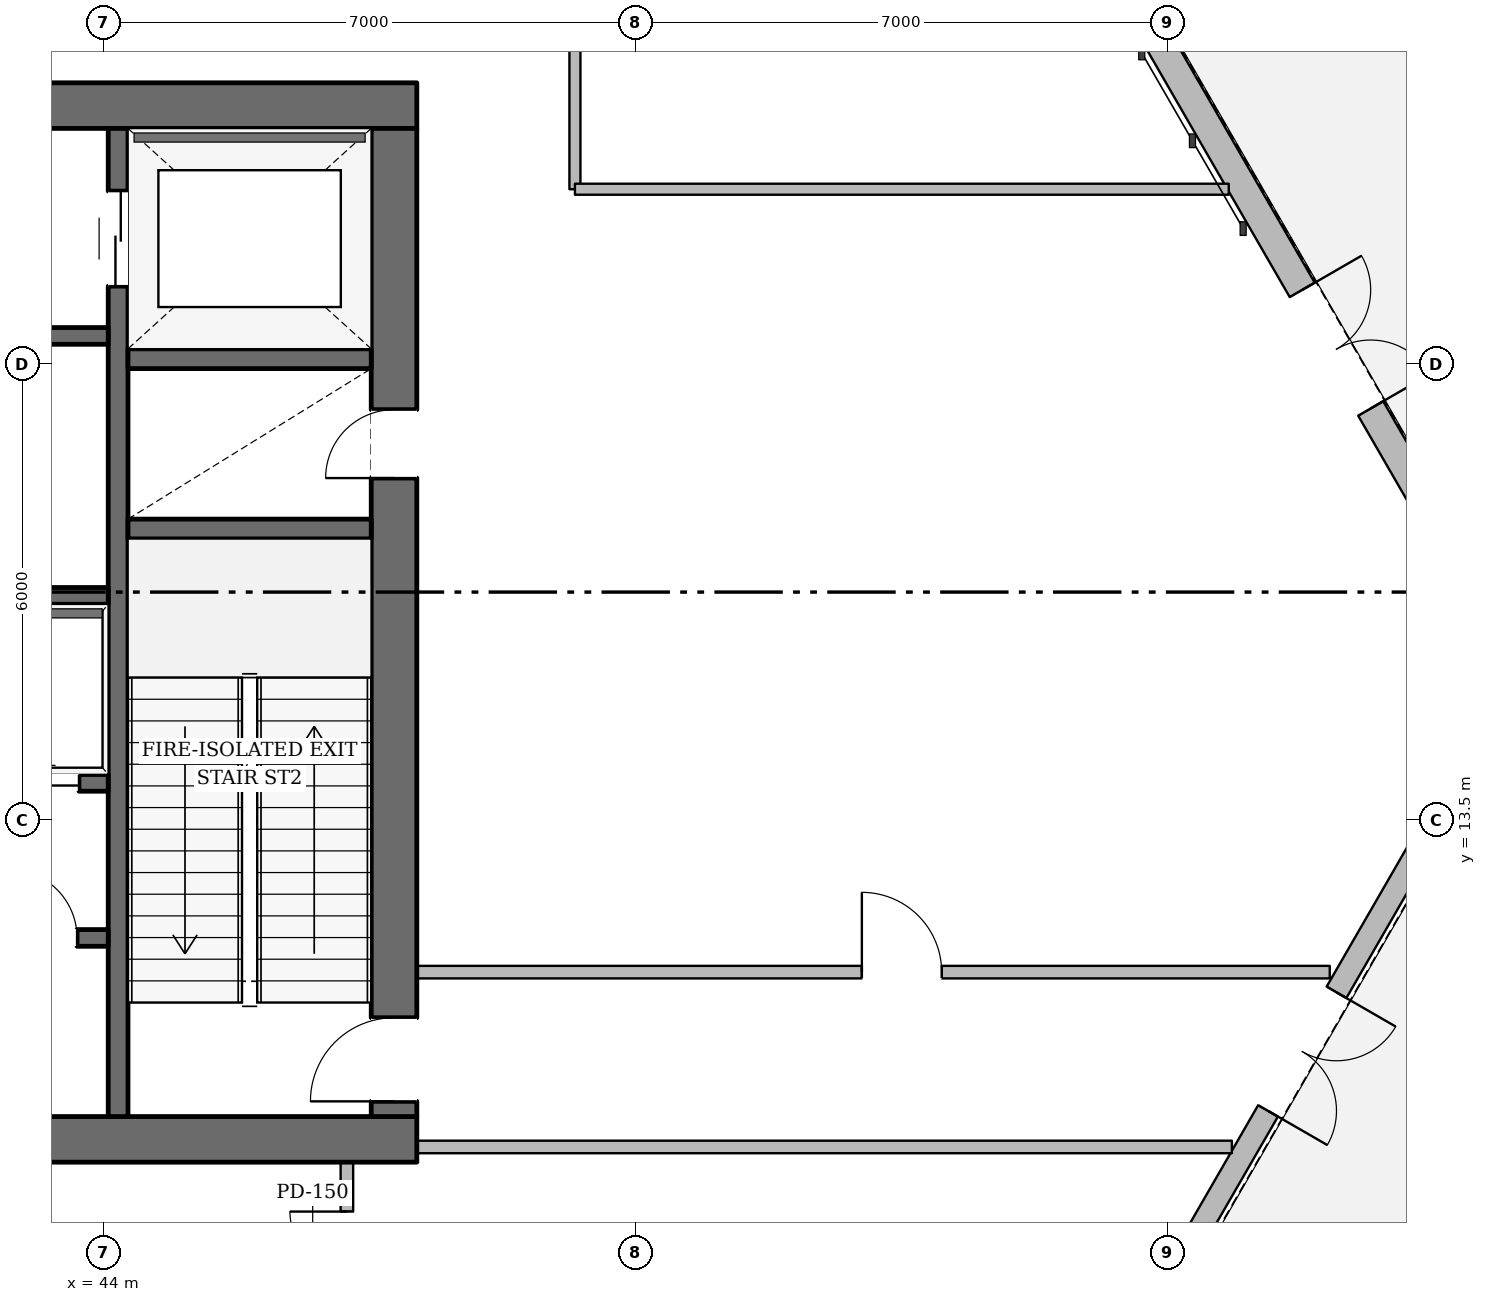
"""IFC4 building model, lengths in metres.
Left out: names, types, materials, properties, quantities, classifications, styles, units other than length and angle.
Written with IfcOpenShell. Run it as: python <this file> out.ifc"""

import sys

from ifc_helpers import new_model, si_unit, direction, frame, frame_2d, origin, place, context, subcontext, project, spatial, rectangle, extrude, element, fill, save


model = new_model("IFC4")
c1 = context("Model", 3, precision=1e-05, world=origin(), true_north=direction((0.0, 1.0)))
c2 = subcontext(c1, "Body", "Model", "MODEL_VIEW")
j1 = project(units=[si_unit("LENGTHUNIT", "METRE"), si_unit("PLANEANGLEUNIT", "RADIAN")], contexts=[c1])
p1 = place(None, origin())
s1 = spatial("IfcSite", under=j1, at=p1, CompositionType="ELEMENT")
p2 = place(p1, origin())
s2 = spatial("IfcBuilding", under=s1, at=p2, CompositionType="ELEMENT")
p3 = place(p2, origin())
s3 = spatial("IfcBuildingStorey", under=s2, at=p3, CompositionType="ELEMENT", Elevation=0.0)
p4 = place(p3, frame((27.88, 9.3, 0.0), z_axis=(0.0, 0.0, 1.0), x_axis=(1.0, 0.0, 0.0)))
e1 = element("IfcWall", 1, at=p4, inside=s3, PredefinedType="SOLIDWALL", context=c2, shape_type="SweptSolid", body=[
    extrude(rectangle(XDim=20.24, YDim=0.6, at=frame_2d((10.12, 0.0))), origin(), (0.0, 0.0, 1.0), 5.74),
])
p5 = place(p4, frame((10.62, 0.0, 0.0)))
e2 = element("IfcOpeningElement", 2, at=p5, cuts=e1, PredefinedType="OPENING", context=c2, shape_type="SweptSolid", body=[
    extrude(rectangle(XDim=1.4, YDim=2.2, at=frame_2d((0.7, 1.1))), frame((0.0, 0.31, 0.0), z_axis=(0.0, -1.0, 0.0), x_axis=(1.0, 0.0, 0.0)), (0.0, 0.0, 1.0), 0.62),
])
p6 = place(p3, frame((27.88, 22.9, 0.0), z_axis=(0.0, 0.0, 1.0), x_axis=(1.0, 0.0, 0.0)))
e3 = element("IfcWall", 3, at=p6, inside=s3, PredefinedType="SOLIDWALL", context=c2, shape_type="SweptSolid", body=[
    extrude(rectangle(XDim=20.24, YDim=0.6, at=frame_2d((10.12, 0.0))), origin(), (0.0, 0.0, 1.0), 5.74),
])
p7 = place(p6, frame((9.595, 0.0, 0.0)))
e4 = element("IfcOpeningElement", 4, at=p7, cuts=e3, PredefinedType="OPENING", context=c2, shape_type="SweptSolid", body=[
    extrude(rectangle(XDim=1.05, YDim=2.15, at=frame_2d((0.525, 1.075))), frame((0.0, 0.31, 0.0), z_axis=(0.0, -1.0, 0.0), x_axis=(1.0, 0.0, 0.0)), (0.0, 0.0, 1.0), 0.62),
])
p8 = place(p6, frame((5.995, 0.0, 0.0)))
e5 = element("IfcOpeningElement", 5, at=p8, cuts=e3, PredefinedType="OPENING", context=c2, shape_type="SweptSolid", body=[
    extrude(rectangle(XDim=1.05, YDim=2.15, at=frame_2d((0.525, 1.075))), frame((0.0, 0.31, 0.0), z_axis=(0.0, -1.0, 0.0), x_axis=(1.0, 0.0, 0.0)), (0.0, 0.0, 1.0), 0.62),
])
p9 = place(p3, frame((47.82, 9.6, 0.0), z_axis=(0.0, 0.0, 1.0), x_axis=(0.0, 1.0, 0.0)))
e6 = element("IfcWall", 6, at=p9, inside=s3, PredefinedType="SOLIDWALL", context=c2, shape_type="SweptSolid", body=[
    extrude(rectangle(XDim=13.0, YDim=0.6, at=frame_2d((6.5, 0.0))), origin(), (0.0, 0.0, 1.0), 5.74),
])
p10 = place(p9, frame((8.4, 0.0, 0.0)))
e7 = element("IfcOpeningElement", 7, at=p10, cuts=e6, PredefinedType="OPENING", context=c2, shape_type="SweptSolid", body=[
    extrude(rectangle(XDim=0.9, YDim=2.1, at=frame_2d((0.45, 1.05))), frame((0.0, 0.31, 0.0), z_axis=(0.0, -1.0, 0.0), x_axis=(1.0, 0.0, 0.0)), (0.0, 0.0, 1.0), 0.62),
])
p11 = place(p9, frame((0.2, 0.0, 0.0)))
e8 = element("IfcOpeningElement", 8, at=p11, cuts=e6, PredefinedType="OPENING", context=c2, shape_type="SweptSolid", body=[
    extrude(rectangle(XDim=1.1, YDim=2.15, at=frame_2d((0.55, 1.075))), frame((0.0, 0.31, 0.0), z_axis=(0.0, -1.0, 0.0), x_axis=(1.0, 0.0, 0.0)), (0.0, 0.0, 1.0), 0.62),
])
p12 = place(p3, frame((44.19, 9.6, 0.0), z_axis=(0.0, 0.0, 1.0), x_axis=(0.0, 1.0, 0.0)))
e9 = element("IfcWall", 9, at=p12, inside=s3, PredefinedType="SHEAR", context=c2, shape_type="SweptSolid", body=[
    extrude(rectangle(XDim=13.0, YDim=0.26, at=frame_2d((6.5, 0.0))), origin(), (0.0, 0.0, 1.0), 5.74),
])
p13 = place(p12, frame((10.925, 0.0, 0.0)))
e10 = element("IfcOpeningElement", 10, at=p13, cuts=e9, PredefinedType="OPENING", context=c2, shape_type="SweptSolid", body=[
    extrude(rectangle(XDim=1.25, YDim=2.25, at=frame_2d((0.625, 1.125))), frame((0.0, 0.14, 0.0), z_axis=(0.0, -1.0, 0.0), x_axis=(1.0, 0.0, 0.0)), (0.0, 0.0, 1.0), 0.28),
])
for number, where, z_axis, x_axis in (
    (11, (44.32, 17.33, 0.0), (0.0, 0.0, 1.0), (1.0, 0.0, 0.0)),
    (12, (44.32, 19.57, 0.0), (0.0, 0.0, 1.0), (1.0, 0.0, 0.0)),
):
    element("IfcWall", number, at=place(p3, frame(where, z_axis=z_axis, x_axis=x_axis)), inside=s3, PredefinedType="SHEAR", context=c2, shape_type="SweptSolid", body=[
        extrude(rectangle(XDim=3.2, YDim=0.26, at=frame_2d((1.6, 0.0))), origin(), (0.0, 0.0, 1.0), 5.74),
    ])
p14 = place(p3, frame((31.94, 19.87, 0.0), z_axis=(0.0, 0.0, 1.0), x_axis=(1.0, 0.0, 0.0)))
e13 = element("IfcWall", 13, at=p14, inside=s3, PredefinedType="SOLIDWALL", context=c2, shape_type="SweptSolid", body=[
    extrude(rectangle(XDim=12.12, YDim=0.22, at=frame_2d((6.06, 0.0))), origin(), (0.0, 0.0, 1.0), 5.74),
])
p15 = place(p14, frame((9.51, 0.0, 0.0)))
e14 = element("IfcOpeningElement", 14, at=p15, cuts=e13, PredefinedType="OPENING", context=c2, shape_type="SweptSolid", body=[
    extrude(rectangle(XDim=0.9, YDim=2.1, at=frame_2d((0.45, 1.05))), frame((0.0, 0.12, 0.0), z_axis=(0.0, -1.0, 0.0), x_axis=(1.0, 0.0, 0.0)), (0.0, 0.0, 1.0), 0.24),
])
p16 = place(p3, frame((31.94, 16.45, 0.0), z_axis=(0.0, 0.0, 1.0), x_axis=(1.0, 0.0, 0.0)))
e15 = element("IfcWall", 15, at=p16, inside=s3, PredefinedType="SOLIDWALL", context=c2, shape_type="SweptSolid", body=[
    extrude(rectangle(XDim=12.12, YDim=0.22, at=frame_2d((6.06, 0.0))), origin(), (0.0, 0.0, 1.0), 5.74),
])
p17 = place(p3, frame((31.94, 13.99, 0.0), z_axis=(0.0, 0.0, 1.0), x_axis=(1.0, 0.0, 0.0)))
e16 = element("IfcWall", 16, at=p17, inside=s3, PredefinedType="SOLIDWALL", context=c2, shape_type="SweptSolid", body=[
    extrude(rectangle(XDim=12.12, YDim=0.22, at=frame_2d((6.06, 0.0))), origin(), (0.0, 0.0, 1.0), 5.74),
])
p18 = place(p17, frame((0.385, 0.0, 0.0)))
e17 = element("IfcOpeningElement", 17, at=p18, cuts=e16, PredefinedType="OPENING", context=c2, shape_type="SweptSolid", body=[
    extrude(rectangle(XDim=1.1, YDim=2.2, at=frame_2d((0.55, 1.1))), frame((0.0, 0.12, 0.0), z_axis=(0.0, -1.0, 0.0), x_axis=(1.0, 0.0, 0.0)), (0.0, 0.0, 1.0), 0.24),
])
p19 = place(p17, frame((2.435, 0.0, 0.0)))
e18 = element("IfcOpeningElement", 18, at=p19, cuts=e16, PredefinedType="OPENING", context=c2, shape_type="SweptSolid", body=[
    extrude(rectangle(XDim=1.1, YDim=2.2, at=frame_2d((0.55, 1.1))), frame((0.0, 0.12, 0.0), z_axis=(0.0, -1.0, 0.0), x_axis=(1.0, 0.0, 0.0)), (0.0, 0.0, 1.0), 0.24),
])
p20 = place(p17, frame((4.485, 0.0, 0.0)))
e19 = element("IfcOpeningElement", 19, at=p20, cuts=e16, PredefinedType="OPENING", context=c2, shape_type="SweptSolid", body=[
    extrude(rectangle(XDim=1.1, YDim=2.2, at=frame_2d((0.55, 1.1))), frame((0.0, 0.12, 0.0), z_axis=(0.0, -1.0, 0.0), x_axis=(1.0, 0.0, 0.0)), (0.0, 0.0, 1.0), 0.24),
])
p21 = place(p17, frame((6.535, 0.0, 0.0)))
e20 = element("IfcOpeningElement", 20, at=p21, cuts=e16, PredefinedType="OPENING", context=c2, shape_type="SweptSolid", body=[
    extrude(rectangle(XDim=1.1, YDim=2.2, at=frame_2d((0.55, 1.1))), frame((0.0, 0.12, 0.0), z_axis=(0.0, -1.0, 0.0), x_axis=(1.0, 0.0, 0.0)), (0.0, 0.0, 1.0), 0.24),
])
p22 = place(p17, frame((8.585, 0.0, 0.0)))
e21 = element("IfcOpeningElement", 21, at=p22, cuts=e16, PredefinedType="OPENING", context=c2, shape_type="SweptSolid", body=[
    extrude(rectangle(XDim=1.1, YDim=2.2, at=frame_2d((0.55, 1.1))), frame((0.0, 0.12, 0.0), z_axis=(0.0, -1.0, 0.0), x_axis=(1.0, 0.0, 0.0)), (0.0, 0.0, 1.0), 0.24),
])
p23 = place(p17, frame((10.635, 0.0, 0.0)))
e22 = element("IfcOpeningElement", 22, at=p23, cuts=e16, PredefinedType="OPENING", context=c2, shape_type="SweptSolid", body=[
    extrude(rectangle(XDim=1.1, YDim=2.2, at=frame_2d((0.55, 1.1))), frame((0.0, 0.12, 0.0), z_axis=(0.0, -1.0, 0.0), x_axis=(1.0, 0.0, 0.0)), (0.0, 0.0, 1.0), 0.24),
])
p24 = place(p3, frame((40.28, 11.95, 0.0), z_axis=(0.0, 0.0, 1.0), x_axis=(1.0, 0.0, 0.0)))
e23 = element("IfcWall", 23, at=p24, inside=s3, PredefinedType="SOLIDWALL", context=c2, shape_type="SweptSolid", body=[
    extrude(rectangle(XDim=3.78, YDim=0.22, at=frame_2d((1.89, 0.0))), origin(), (0.0, 0.0, 1.0), 5.74),
])
p25 = place(p24, frame((0.62, 0.0, 0.0)))
e24 = element("IfcOpeningElement", 24, at=p25, cuts=e23, PredefinedType="OPENING", context=c2, shape_type="SweptSolid", body=[
    extrude(rectangle(XDim=0.9, YDim=2.1, at=frame_2d((0.45, 1.05))), frame((0.0, 0.12, 0.0), z_axis=(0.0, -1.0, 0.0), x_axis=(1.0, 0.0, 0.0)), (0.0, 0.0, 1.0), 0.24),
])
p26 = place(p24, frame((2.47, 0.0, 0.0)))
e25 = element("IfcOpeningElement", 25, at=p26, cuts=e23, PredefinedType="OPENING", context=c2, shape_type="SweptSolid", body=[
    extrude(rectangle(XDim=0.9, YDim=2.1, at=frame_2d((0.45, 1.05))), frame((0.0, 0.12, 0.0), z_axis=(0.0, -1.0, 0.0), x_axis=(1.0, 0.0, 0.0)), (0.0, 0.0, 1.0), 0.24),
])
p27 = place(p3, frame((62.823, 15.743, 0.0), z_axis=(0.0, 0.0, 1.0), x_axis=(-0.500005062714, -0.866022480806, 0.0)))
e26 = element("IfcWall", 26, at=p27, inside=s3, PredefinedType="STANDARD", context=c2, shape_type="SweptSolid", body=[
    extrude(rectangle(XDim=17.448, YDim=0.3, at=frame_2d((8.724, 0.0))), origin(), (0.0, 0.0, 1.0), 3.43),
])
p28 = place(p27, frame((5.206, 0.0, 0.0)))
e27 = element("IfcOpeningElement", 27, at=p28, cuts=e26, PredefinedType="OPENING", context=c2, shape_type="SweptSolid", body=[
    extrude(rectangle(XDim=1.8, YDim=2.25, at=frame_2d((0.9, 1.125))), frame((0.0, 0.16, 0.0), z_axis=(0.0, -1.0, 0.0), x_axis=(1.0, 0.0, 0.0)), (0.0, 0.0, 1.0), 0.32),
])
p29 = place(p27, frame((10.612, 0.0, 0.0)))
e28 = element("IfcOpeningElement", 28, at=p29, cuts=e26, PredefinedType="OPENING", context=c2, shape_type="SweptSolid", body=[
    extrude(rectangle(XDim=2.0, YDim=2.6, at=frame_2d((1.0, 1.3))), frame((0.0, 0.16, 0.0), z_axis=(0.0, -1.0, 0.0), x_axis=(1.0, 0.0, 0.0)), (0.0, 0.0, 1.0), 0.32),
])
p30 = place(p3, frame((46.242, 43.904, 0.0), z_axis=(0.0, 0.0, 1.0), x_axis=(0.500000109808, -0.866025340387, 0.0)))
e29 = element("IfcWall", 29, at=p30, inside=s3, PredefinedType="STANDARD", context=c2, shape_type="SweptSolid", body=[
    extrude(rectangle(XDim=33.16, YDim=0.38, at=frame_2d((16.58, 0.0))), origin(), (0.0, 0.0, 1.0), 3.43),
])
p31 = place(p30, frame((27.053, 0.0, 0.0)))
e30 = element("IfcOpeningElement", 30, at=p31, cuts=e29, PredefinedType="OPENING", context=c2, shape_type="SweptSolid", body=[
    extrude(rectangle(XDim=1.8, YDim=2.25, at=frame_2d((0.9, 1.125))), frame((0.0, 0.2, 0.0), z_axis=(0.0, -1.0, 0.0), x_axis=(1.0, 0.0, 0.0)), (0.0, 0.0, 1.0), 0.4),
])
p32 = place(p30, frame((1.861, 0.0, 0.55)))
e31 = element("IfcOpeningElement", 31, at=p32, cuts=e29, PredefinedType="OPENING", context=c2, shape_type="SweptSolid", body=[
    extrude(rectangle(XDim=2.6, YDim=2.55, at=frame_2d((1.3, 1.275))), frame((0.0, 0.2, 0.0), z_axis=(0.0, -1.0, 0.0), x_axis=(1.0, 0.0, 0.0)), (0.0, 0.0, 1.0), 0.4),
])
p33 = place(p3, frame((58.843, 9.2, 0.0), z_axis=(0.0, 0.0, 1.0), x_axis=(-1.0, 0.0, 0.0)))
e32 = element("IfcWall", 32, at=p33, inside=s3, PredefinedType="PARTITIONING", context=c2, shape_type="SweptSolid", body=[
    extrude(rectangle(XDim=10.723, YDim=0.165, at=frame_2d((5.361, 0.0))), origin(), (0.0, 0.0, 1.0), 5.74),
])
p34 = place(p3, frame((48.12, 11.5, 0.0), z_axis=(0.0, 0.0, 1.0), x_axis=(1.0, 0.0, 0.0)))
e33 = element("IfcWall", 33, at=p34, inside=s3, PredefinedType="PARTITIONING", context=c2, shape_type="SweptSolid", body=[
    extrude(rectangle(XDim=12.01, YDim=0.165, at=frame_2d((6.005, 0.0))), origin(), (0.0, 0.0, 1.0), 5.74),
])
p35 = place(p34, frame((5.855, 0.0, 0.0)))
e34 = element("IfcOpeningElement", 34, at=p35, cuts=e33, PredefinedType="OPENING", context=c2, shape_type="SweptSolid", body=[
    extrude(rectangle(XDim=1.05, YDim=2.15, at=frame_2d((0.525, 1.075))), frame((0.0, 0.093, 0.0), z_axis=(0.0, -1.0, 0.0), x_axis=(1.0, 0.0, 0.0)), (0.0, 0.0, 1.0), 0.185),
])
p36 = place(p3, frame((47.2, 1.085, 0.0), z_axis=(0.0, 0.0, 1.0), x_axis=(0.0, 1.0, 0.0)))
e35 = element("IfcWall", 35, at=p36, inside=s3, PredefinedType="PARTITIONING", context=c2, shape_type="SweptSolid", body=[
    extrude(rectangle(XDim=8.035, YDim=0.165, at=frame_2d((4.018, 0.0))), origin(), (0.0, 0.0, 1.0), 5.74),
])
p37 = place(p36, frame((5.765, 0.0, 0.0)))
e36 = element("IfcOpeningElement", 36, at=p37, cuts=e35, PredefinedType="OPENING", context=c2, shape_type="SweptSolid", body=[
    extrude(rectangle(XDim=1.5, YDim=2.25, at=frame_2d((0.75, 1.125))), frame((0.0, 0.093, 0.0), z_axis=(0.0, -1.0, 0.0), x_axis=(1.0, 0.0, 0.0)), (0.0, 0.0, 1.0), 0.185),
])
p38 = place(p3, frame((50.2, 21.8, 0.0), z_axis=(0.0, 0.0, 1.0), x_axis=(0.0, 1.0, 0.0)))
e37 = element("IfcWall", 37, at=p38, inside=s3, PredefinedType="PARTITIONING", context=c2, shape_type="SweptSolid", body=[
    extrude(rectangle(XDim=14.899, YDim=0.145, at=frame_2d((7.449, 0.0))), origin(), (0.0, 0.0, 1.0), 3.435),
])
p39 = place(p38, frame((3.0, 0.0, 0.0)))
e38 = element("IfcOpeningElement", 38, at=p39, cuts=e37, PredefinedType="OPENING", context=c2, shape_type="SweptSolid", body=[
    extrude(rectangle(XDim=1.4, YDim=2.2, at=frame_2d((0.7, 1.1))), frame((0.0, 0.083, 0.0), z_axis=(0.0, -1.0, 0.0), x_axis=(1.0, 0.0, 0.0)), (0.0, 0.0, 1.0), 0.165),
])
p40 = place(p3, frame((50.2, 21.8, 0.0), z_axis=(0.0, 0.0, 1.0), x_axis=(1.0, 0.0, 0.0)))
e39 = element("IfcWall", 39, at=p40, inside=s3, PredefinedType="PARTITIONING", context=c2, shape_type="SweptSolid", body=[
    extrude(rectangle(XDim=8.602, YDim=0.145, at=frame_2d((4.301, 0.0))), origin(), (0.0, 0.0, 1.0), 5.74),
])
p41 = place(p28, origin())
e40 = element("IfcDoor", 40, at=p41, inside=s3, OperationType="DOUBLE_DOOR_SINGLE_SWING", PredefinedType="DOOR", context=c2, shape_type="SweptSolid", body=[
    extrude(rectangle(XDim=1.8, YDim=2.25, at=frame_2d((0.9, 1.125))), frame((0.0, 0.025, 0.0), z_axis=(0.0, -1.0, 0.0), x_axis=(1.0, 0.0, 0.0)), (0.0, 0.0, 1.0), 0.05),
])
fill(e27, e40)
p42 = place(p31, origin())
e41 = element("IfcDoor", 41, at=p42, inside=s3, OperationType="DOUBLE_DOOR_SINGLE_SWING", PredefinedType="DOOR", context=c2, shape_type="SweptSolid", body=[
    extrude(rectangle(XDim=1.8, YDim=2.25, at=frame_2d((0.9, 1.125))), frame((0.0, 0.025, 0.0), z_axis=(0.0, -1.0, 0.0), x_axis=(1.0, 0.0, 0.0)), (0.0, 0.0, 1.0), 0.05),
])
fill(e30, e41)
p43 = place(p10, origin())
e42 = element("IfcDoor", 42, at=p43, inside=s3, OperationType="SINGLE_SWING_LEFT", PredefinedType="DOOR", context=c2, shape_type="SweptSolid", body=[
    extrude(rectangle(XDim=0.9, YDim=2.1, at=frame_2d((0.45, 1.05))), frame((0.0, 0.025, 0.0), z_axis=(0.0, -1.0, 0.0), x_axis=(1.0, 0.0, 0.0)), (0.0, 0.0, 1.0), 0.05),
])
fill(e7, e42)
p44 = place(p13, origin())
e43 = element("IfcDoor", 43, at=p44, inside=s3, OperationType="DOUBLE_DOOR_SLIDING", PredefinedType="DOOR", context=c2, shape_type="SweptSolid", body=[
    extrude(rectangle(XDim=1.25, YDim=2.25, at=frame_2d((0.625, 1.125))), frame((0.0, 0.025, 0.0), z_axis=(0.0, -1.0, 0.0), x_axis=(1.0, 0.0, 0.0)), (0.0, 0.0, 1.0), 0.05),
])
fill(e10, e43)
p45 = place(p23, origin())
e44 = element("IfcDoor", 44, at=p45, inside=s3, OperationType="DOUBLE_DOOR_SLIDING", PredefinedType="DOOR", context=c2, shape_type="SweptSolid", body=[
    extrude(rectangle(XDim=1.1, YDim=2.2, at=frame_2d((0.55, 1.1))), frame((0.0, 0.025, 0.0), z_axis=(0.0, -1.0, 0.0), x_axis=(1.0, 0.0, 0.0)), (0.0, 0.0, 1.0), 0.05),
])
fill(e22, e44)
p46 = place(p26, origin())
e45 = element("IfcDoor", 45, at=p46, inside=s3, OperationType="SINGLE_SWING_LEFT", PredefinedType="DOOR", context=c2, shape_type="SweptSolid", body=[
    extrude(rectangle(XDim=0.9, YDim=2.1, at=frame_2d((0.45, 1.05))), frame((0.0, 0.025, 0.0), z_axis=(0.0, -1.0, 0.0), x_axis=(1.0, 0.0, 0.0)), (0.0, 0.0, 1.0), 0.05),
])
fill(e25, e45)
p47 = place(p11, origin())
e46 = element("IfcDoor", 46, at=p47, inside=s3, OperationType="SINGLE_SWING_LEFT", PredefinedType="DOOR", context=c2, shape_type="SweptSolid", body=[
    extrude(rectangle(XDim=1.1, YDim=2.15, at=frame_2d((0.55, 1.075))), frame((0.0, 0.025, 0.0), z_axis=(0.0, -1.0, 0.0), x_axis=(1.0, 0.0, 0.0)), (0.0, 0.0, 1.0), 0.05),
])
fill(e8, e46)
p48 = place(p37, origin())
e47 = element("IfcDoor", 47, at=p48, inside=s3, OperationType="DOUBLE_DOOR_SINGLE_SWING", PredefinedType="DOOR", context=c2, shape_type="SweptSolid", body=[
    extrude(rectangle(XDim=1.5, YDim=2.25, at=frame_2d((0.75, 1.125))), frame((0.0, 0.025, 0.0), z_axis=(0.0, -1.0, 0.0), x_axis=(1.0, 0.0, 0.0)), (0.0, 0.0, 1.0), 0.05),
])
fill(e36, e47)
p49 = place(p35, origin())
e48 = element("IfcDoor", 48, at=p49, inside=s3, OperationType="SINGLE_SWING_LEFT", PredefinedType="DOOR", context=c2, shape_type="SweptSolid", body=[
    extrude(rectangle(XDim=1.05, YDim=2.15, at=frame_2d((0.525, 1.075))), frame((0.0, 0.025, 0.0), z_axis=(0.0, -1.0, 0.0), x_axis=(1.0, 0.0, 0.0)), (0.0, 0.0, 1.0), 0.05),
])
fill(e34, e48)
save(model, sys.argv[1])
